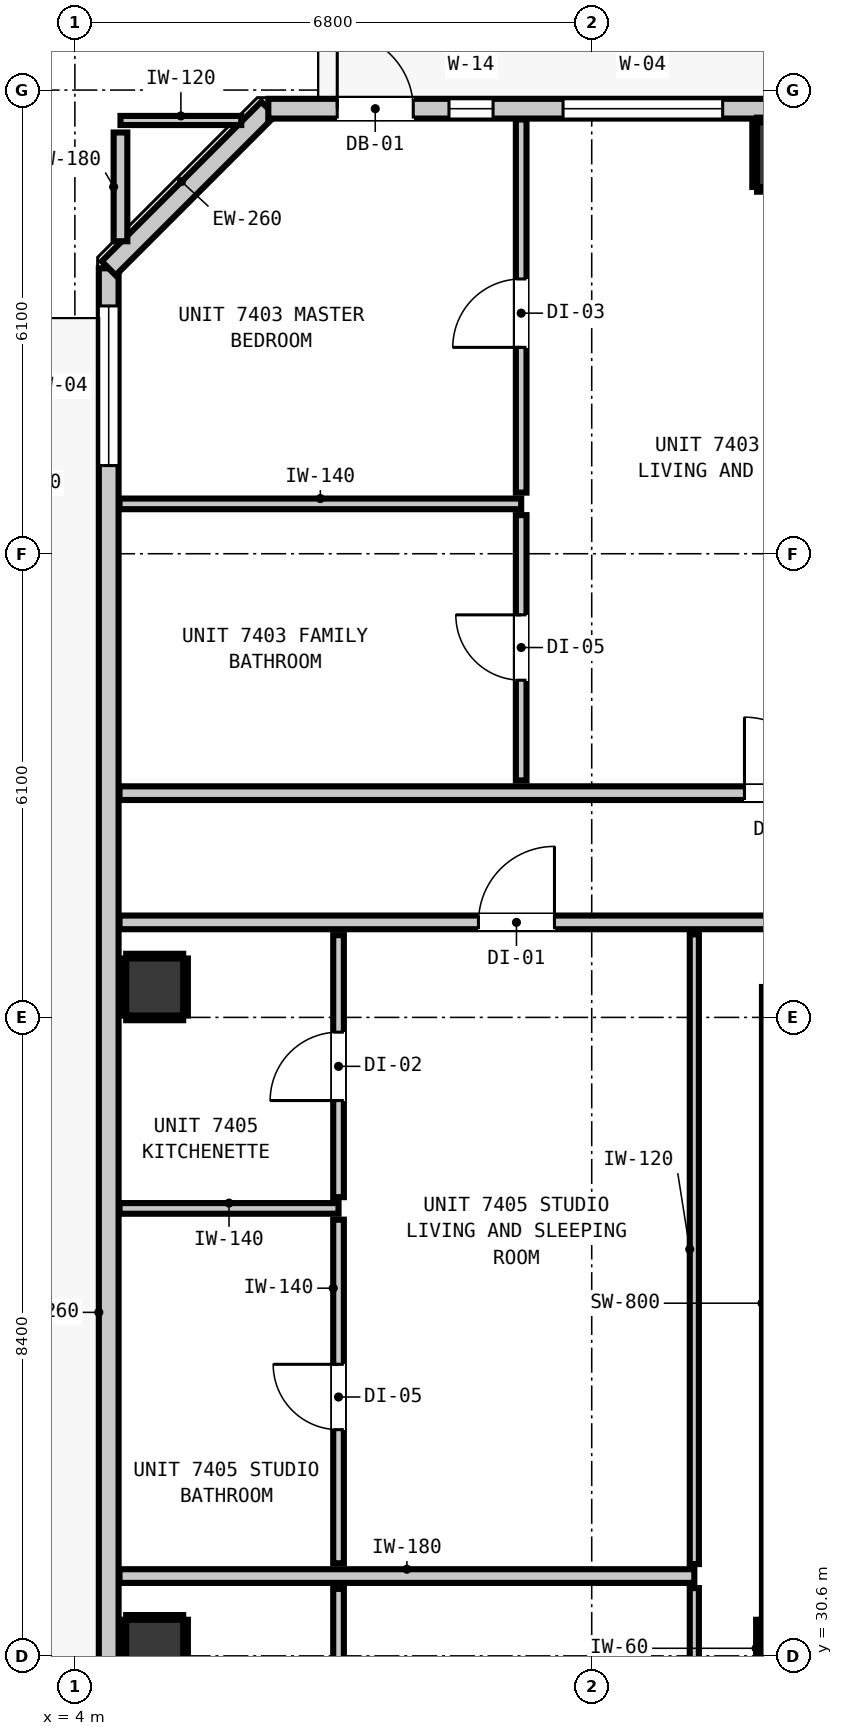
"""IFC4 building model, lengths in metres.
Left out: names, types, materials, properties, quantities, classifications, styles, units other than length and angle.
Written with IfcOpenShell. Run it as: python <this file> out.ifc"""

import sys

from ifc_helpers import new_model, si_unit, direction, frame, frame_2d, origin, origin_2d, place, context, subcontext, project, spatial, rectangle, extrude, element, fill, save


model = new_model("IFC4")
c1 = context("Model", 3, precision=1e-05, world=origin(), true_north=direction((0.0, 1.0)))
c2 = subcontext(c1, "Body", "Model", "MODEL_VIEW")
j1 = project(units=[si_unit("LENGTHUNIT", "METRE"), si_unit("PLANEANGLEUNIT", "RADIAN")], contexts=[c1])
p1 = place(None, origin())
s1 = spatial("IfcSite", under=j1, at=p1, CompositionType="ELEMENT")
p2 = place(p1, origin())
s2 = spatial("IfcBuilding", under=s1, at=p2, CompositionType="ELEMENT")
p3 = place(p2, frame((0.0, 0.0, 254.52)))
s3 = spatial("IfcBuildingStorey", under=s2, at=p3, CompositionType="ELEMENT", Elevation=254.52)
p4 = place(p3, frame((13.4, 30.7, 0.0), z_axis=(0.0, 0.0, 1.0), x_axis=(1.0, 0.0, 0.0)))
e1 = element("IfcColumn", 1, at=p4, inside=s3, PredefinedType="COLUMN", context=c2, shape_type="SweptSolid", body=[
    extrude(rectangle(XDim=0.75, YDim=0.75, at=origin_2d()), origin(), (0.0, 0.0, 1.0), 3.32),
])
p5 = place(p3, frame((13.44, 31.08, 0.0), z_axis=(0.0, 0.0, 1.0), x_axis=(0.0, 1.0, 0.0)))
e2 = element("IfcWall", 2, at=p5, inside=s3, PredefinedType="SHEAR", context=c2, shape_type="SweptSolid", body=[
    extrude(rectangle(XDim=8.32, YDim=0.8, at=frame_2d((4.16, 0.0))), origin(), (0.0, 0.0, 1.0), 3.32),
])
p6 = place(p3, frame((13.4, 50.35, 0.0), z_axis=(0.0, 0.0, 1.0), x_axis=(1.0, 0.0, 0.0)))
e3 = element("IfcColumn", 3, at=p6, inside=s3, PredefinedType="COLUMN", context=c2, shape_type="SweptSolid", body=[
    extrude(rectangle(XDim=0.85, YDim=0.85, at=origin_2d()), origin(), (0.0, 0.0, 1.0), 3.32),
])
for number, where, z_axis, x_axis in (
    (4, (5.05, 30.7, 0.0), (0.0, 0.0, 1.0), (1.0, 0.0, 0.0)),
    (5, (5.05, 39.4, 0.0), (0.0, 0.0, 1.0), (1.0, 0.0, 0.0)),
):
    element("IfcColumn", number, at=place(p3, frame(where, z_axis=z_axis, x_axis=x_axis)), inside=s3, PredefinedType="COLUMN", context=c2, shape_type="SweptSolid", body=[
        extrude(rectangle(XDim=0.75, YDim=0.75, at=origin_2d()), origin(), (0.0, 0.0, 1.0), 3.32),
    ])
p7 = place(p3, frame((4.445, 18.545, 0.0), z_axis=(0.0, 0.0, 1.0), x_axis=(0.0, 1.0, 0.0)))
e6 = element("IfcWall", 6, at=p7, inside=s3, PredefinedType="STANDARD", context=c2, shape_type="SweptSolid", body=[
    extrude(rectangle(XDim=30.31, YDim=0.26, at=frame_2d((15.155, 0.0))), origin(), (0.0, 0.0, 1.0), 2.96),
])
p8 = place(p7, frame((4.434, 0.0, 0.0)))
e7 = element("IfcOpeningElement", 7, at=p8, cuts=e6, PredefinedType="OPENING", context=c2, shape_type="SweptSolid", body=[
    extrude(rectangle(XDim=1.0, YDim=2.15, at=frame_2d((0.5, 1.075))), frame((0.0, 0.14, 0.0), z_axis=(0.0, -1.0, 0.0), x_axis=(1.0, 0.0, 0.0)), (0.0, 0.0, 1.0), 0.28),
])
p9 = place(p7, frame((27.715, 0.0, 0.85)))
e8 = element("IfcOpeningElement", 8, at=p9, cuts=e6, PredefinedType="OPENING", context=c2, shape_type="SweptSolid", body=[
    extrude(rectangle(XDim=2.1, YDim=1.9, at=frame_2d((1.05, 0.95))), frame((0.0, 0.14, 0.0), z_axis=(0.0, -1.0, 0.0), x_axis=(1.0, 0.0, 0.0)), (0.0, 0.0, 1.0), 0.28),
])
p10 = place(p3, frame((4.445, 48.855, 0.0), z_axis=(0.0, 0.0, 1.0), x_axis=(0.707065676302, 0.707147883682, 0.0)))
e9 = element("IfcWall", 9, at=p10, inside=s3, PredefinedType="STANDARD", context=c2, shape_type="SweptSolid", body=[
    extrude(rectangle(XDim=2.97, YDim=0.26, at=frame_2d((1.485, 0.0))), origin(), (0.0, 0.0, 1.0), 2.96),
])
p11 = place(p3, frame((6.545, 50.955, 0.0), z_axis=(0.0, 0.0, 1.0), x_axis=(1.0, 0.0, 0.0)))
e10 = element("IfcWall", 10, at=p11, inside=s3, PredefinedType="STANDARD", context=c2, shape_type="SweptSolid", body=[
    extrude(rectangle(XDim=32.71, YDim=0.26, at=frame_2d((16.355, 0.0))), origin(), (0.0, 0.0, 1.0), 2.96),
])
p12 = place(p11, frame((0.907, 0.0, 0.0)))
e11 = element("IfcOpeningElement", 11, at=p12, cuts=e10, PredefinedType="OPENING", context=c2, shape_type="SweptSolid", body=[
    extrude(rectangle(XDim=1.0, YDim=2.15, at=frame_2d((0.5, 1.075))), frame((0.0, 0.14, 0.0), z_axis=(0.0, -1.0, 0.0), x_axis=(1.0, 0.0, 0.0)), (0.0, 0.0, 1.0), 0.28),
])
p13 = place(p11, frame((3.878, 0.0, 0.85)))
e12 = element("IfcOpeningElement", 12, at=p13, cuts=e10, PredefinedType="OPENING", context=c2, shape_type="SweptSolid", body=[
    extrude(rectangle(XDim=2.1, YDim=1.9, at=frame_2d((1.05, 0.95))), frame((0.0, 0.14, 0.0), z_axis=(0.0, -1.0, 0.0), x_axis=(1.0, 0.0, 0.0)), (0.0, 0.0, 1.0), 0.28),
])
p14 = place(p11, frame((2.377, 0.0, 0.85)))
e13 = element("IfcOpeningElement", 13, at=p14, cuts=e10, PredefinedType="OPENING", context=c2, shape_type="SweptSolid", body=[
    extrude(rectangle(XDim=0.58, YDim=1.5, at=frame_2d((0.29, 0.75))), frame((0.0, 0.14, 0.0), z_axis=(0.0, -1.0, 0.0), x_axis=(1.0, 0.0, 0.0)), (0.0, 0.0, 1.0), 0.28),
])
p15 = place(p11, frame((11.016, 0.0, 0.85)))
e14 = element("IfcOpeningElement", 14, at=p15, cuts=e10, PredefinedType="OPENING", context=c2, shape_type="SweptSolid", body=[
    extrude(rectangle(XDim=2.1, YDim=1.9, at=frame_2d((1.05, 0.95))), frame((0.0, 0.14, 0.0), z_axis=(0.0, -1.0, 0.0), x_axis=(1.0, 0.0, 0.0)), (0.0, 0.0, 1.0), 0.28),
])
p16 = place(p11, frame((17.555, 0.0, 0.85)))
e15 = element("IfcOpeningElement", 15, at=p16, cuts=e10, PredefinedType="OPENING", context=c2, shape_type="SweptSolid", body=[
    extrude(rectangle(XDim=2.1, YDim=1.9, at=frame_2d((1.05, 0.95))), frame((0.0, 0.14, 0.0), z_axis=(0.0, -1.0, 0.0), x_axis=(1.0, 0.0, 0.0)), (0.0, 0.0, 1.0), 0.28),
])
p17 = place(p11, frame((25.255, 0.0, 0.85)))
e16 = element("IfcOpeningElement", 16, at=p17, cuts=e10, PredefinedType="OPENING", context=c2, shape_type="SweptSolid", body=[
    extrude(rectangle(XDim=2.1, YDim=1.9, at=frame_2d((1.05, 0.95))), frame((0.0, 0.14, 0.0), z_axis=(0.0, -1.0, 0.0), x_axis=(1.0, 0.0, 0.0)), (0.0, 0.0, 1.0), 0.28),
])
p18 = place(p3, frame((4.587, 31.65, 0.0), z_axis=(0.0, 0.0, 1.0), x_axis=(1.0, 0.0, 0.0)))
e17 = element("IfcWall", 17, at=p18, inside=s3, PredefinedType="PARTITIONING", context=c2, shape_type="SweptSolid", body=[
    extrude(rectangle(XDim=7.563, YDim=0.18, at=frame_2d((3.781, 0.0))), origin(), (0.0, 0.0, 1.0), 2.96),
])
p19 = place(p3, frame((4.587, 40.25, 0.0), z_axis=(0.0, 0.0, 1.0), x_axis=(1.0, 0.0, 0.0)))
e18 = element("IfcWall", 18, at=p19, inside=s3, PredefinedType="PARTITIONING", context=c2, shape_type="SweptSolid", body=[
    extrude(rectangle(XDim=36.626, YDim=0.18, at=frame_2d((18.313, 0.0))), origin(), (0.0, 0.0, 1.0), 2.96),
])
p20 = place(p19, frame((12.848, 0.0, 0.0)))
e19 = element("IfcOpeningElement", 19, at=p20, cuts=e18, PredefinedType="OPENING", context=c2, shape_type="SweptSolid", body=[
    extrude(rectangle(XDim=1.4, YDim=2.15, at=frame_2d((0.7, 1.075))), frame((0.0, 0.1, 0.0), z_axis=(0.0, -1.0, 0.0), x_axis=(1.0, 0.0, 0.0)), (0.0, 0.0, 1.0), 0.2),
])
p21 = place(p19, frame((4.723, 0.0, 0.0)))
e20 = element("IfcOpeningElement", 20, at=p21, cuts=e18, PredefinedType="OPENING", context=c2, shape_type="SweptSolid", body=[
    extrude(rectangle(XDim=1.0, YDim=2.15, at=frame_2d((0.5, 1.075))), frame((0.0, 0.1, 0.0), z_axis=(0.0, -1.0, 0.0), x_axis=(1.0, 0.0, 0.0)), (0.0, 0.0, 1.0), 0.2),
])
p22 = place(p3, frame((4.587, 41.95, 0.0), z_axis=(0.0, 0.0, 1.0), x_axis=(1.0, 0.0, 0.0)))
e21 = element("IfcWall", 21, at=p22, inside=s3, PredefinedType="PARTITIONING", context=c2, shape_type="SweptSolid", body=[
    extrude(rectangle(XDim=36.626, YDim=0.18, at=frame_2d((18.313, 0.0))), origin(), (0.0, 0.0, 1.0), 2.96),
])
p23 = place(p22, frame((8.223, 0.0, 0.0)))
e22 = element("IfcOpeningElement", 22, at=p23, cuts=e21, PredefinedType="OPENING", context=c2, shape_type="SweptSolid", body=[
    extrude(rectangle(XDim=1.0, YDim=2.15, at=frame_2d((0.5, 1.075))), frame((0.0, 0.1, 0.0), z_axis=(0.0, -1.0, 0.0), x_axis=(1.0, 0.0, 0.0)), (0.0, 0.0, 1.0), 0.2),
])
p24 = place(p22, frame((29.299, 0.0, 0.0)))
e23 = element("IfcOpeningElement", 23, at=p24, cuts=e21, PredefinedType="OPENING", context=c2, shape_type="SweptSolid", body=[
    extrude(rectangle(XDim=0.9, YDim=2.1, at=frame_2d((0.45, 1.05))), frame((0.0, 0.1, 0.0), z_axis=(0.0, -1.0, 0.0), x_axis=(1.0, 0.0, 0.0)), (0.0, 0.0, 1.0), 0.2),
])
p25 = place(p3, frame((4.587, 36.487, 0.0), z_axis=(0.0, 0.0, 1.0), x_axis=(1.0, 0.0, 0.0)))
e24 = element("IfcWall", 24, at=p25, inside=s3, PredefinedType="PARTITIONING", context=c2, shape_type="SweptSolid", body=[
    extrude(rectangle(XDim=2.882, YDim=0.14, at=frame_2d((1.441, 0.0))), origin(), (0.0, 0.0, 1.0), 2.96),
])
p26 = place(p3, frame((4.587, 45.756, 0.0), z_axis=(0.0, 0.0, 1.0), x_axis=(1.0, 0.0, 0.0)))
e25 = element("IfcWall", 25, at=p26, inside=s3, PredefinedType="PARTITIONING", context=c2, shape_type="SweptSolid", body=[
    extrude(rectangle(XDim=5.285, YDim=0.14, at=frame_2d((2.643, 0.0))), origin(), (0.0, 0.0, 1.0), 2.96),
])
p27 = place(p3, frame((4.6, 50.8, 0.0), z_axis=(0.0, 0.0, 1.0), x_axis=(1.0, 0.0, 0.0)))
e26 = element("IfcWall", 26, at=p27, inside=s3, PredefinedType="PARTITIONING", context=c2, shape_type="SweptSolid", body=[
    extrude(rectangle(XDim=1.589, YDim=0.12, at=frame_2d((0.794, 0.0))), origin(), (0.0, 0.0, 1.0), 2.96),
])
p28 = place(p3, frame((4.6, 49.211, 0.0), z_axis=(0.0, 0.0, 1.0), x_axis=(0.0, 1.0, 0.0)))
e27 = element("IfcWall", 27, at=p28, inside=s3, PredefinedType="PARTITIONING", context=c2, shape_type="SweptSolid", body=[
    extrude(rectangle(XDim=1.431, YDim=0.18, at=frame_2d((0.716, 0.0))), origin(), (0.0, 0.0, 1.0), 2.96),
])
p29 = place(p3, frame((7.469, 26.448, 0.0), z_axis=(0.0, 0.0, 1.0), x_axis=(0.0, 1.0, 0.0)))
e28 = element("IfcWall", 28, at=p29, inside=s3, PredefinedType="PARTITIONING", context=c2, shape_type="SweptSolid", body=[
    extrude(rectangle(XDim=5.034, YDim=0.14, at=frame_2d((2.517, 0.0))), origin(), (0.0, 0.0, 1.0), 2.96),
])
p30 = place(p29, frame((2.009, 0.0, 0.0)))
e29 = element("IfcOpeningElement", 29, at=p30, cuts=e28, PredefinedType="OPENING", context=c2, shape_type="SweptSolid", body=[
    extrude(rectangle(XDim=0.86, YDim=2.02, at=frame_2d((0.43, 1.01))), frame((0.0, 0.08, 0.0), z_axis=(0.0, -1.0, 0.0), x_axis=(1.0, 0.0, 0.0)), (0.0, 0.0, 1.0), 0.16),
])
p31 = place(p3, frame((7.469, 31.818, 0.0), z_axis=(0.0, 0.0, 1.0), x_axis=(0.0, 1.0, 0.0)))
e30 = element("IfcWall", 30, at=p31, inside=s3, PredefinedType="PARTITIONING", context=c2, shape_type="SweptSolid", body=[
    extrude(rectangle(XDim=4.521, YDim=0.14, at=frame_2d((2.26, 0.0))), origin(), (0.0, 0.0, 1.0), 2.96),
])
p32 = place(p31, frame((1.758, 0.0, 0.0)))
e31 = element("IfcOpeningElement", 31, at=p32, cuts=e30, PredefinedType="OPENING", context=c2, shape_type="SweptSolid", body=[
    extrude(rectangle(XDim=0.86, YDim=2.02, at=frame_2d((0.43, 1.01))), frame((0.0, 0.08, 0.0), z_axis=(0.0, -1.0, 0.0), x_axis=(1.0, 0.0, 0.0)), (0.0, 0.0, 1.0), 0.16),
])
p33 = place(p3, frame((7.469, 36.635, 0.0), z_axis=(0.0, 0.0, 1.0), x_axis=(0.0, 1.0, 0.0)))
e32 = element("IfcWall", 32, at=p33, inside=s3, PredefinedType="PARTITIONING", context=c2, shape_type="SweptSolid", body=[
    extrude(rectangle(XDim=3.447, YDim=0.14, at=frame_2d((1.724, 0.0))), origin(), (0.0, 0.0, 1.0), 2.96),
])
p34 = place(p33, frame((1.271, 0.0, 0.0)))
e33 = element("IfcOpeningElement", 33, at=p34, cuts=e32, PredefinedType="OPENING", context=c2, shape_type="SweptSolid", body=[
    extrude(rectangle(XDim=0.9, YDim=2.1, at=frame_2d((0.45, 1.05))), frame((0.0, 0.08, 0.0), z_axis=(0.0, -1.0, 0.0), x_axis=(1.0, 0.0, 0.0)), (0.0, 0.0, 1.0), 0.16),
])
p35 = place(p3, frame((9.872, 42.118, 0.0), z_axis=(0.0, 0.0, 1.0), x_axis=(0.0, 1.0, 0.0)))
e34 = element("IfcWall", 34, at=p35, inside=s3, PredefinedType="PARTITIONING", context=c2, shape_type="SweptSolid", body=[
    extrude(rectangle(XDim=3.49, YDim=0.14, at=frame_2d((1.745, 0.0))), origin(), (0.0, 0.0, 1.0), 2.96),
])
p36 = place(p35, frame((1.318, 0.0, 0.0)))
e35 = element("IfcOpeningElement", 35, at=p36, cuts=e34, PredefinedType="OPENING", context=c2, shape_type="SweptSolid", body=[
    extrude(rectangle(XDim=0.86, YDim=2.02, at=frame_2d((0.43, 1.01))), frame((0.0, 0.08, 0.0), z_axis=(0.0, -1.0, 0.0), x_axis=(1.0, 0.0, 0.0)), (0.0, 0.0, 1.0), 0.16),
])
p37 = place(p3, frame((9.872, 45.904, 0.0), z_axis=(0.0, 0.0, 1.0), x_axis=(0.0, 1.0, 0.0)))
e36 = element("IfcWall", 36, at=p37, inside=s3, PredefinedType="PARTITIONING", context=c2, shape_type="SweptSolid", body=[
    extrude(rectangle(XDim=4.909, YDim=0.14, at=frame_2d((2.455, 0.0))), origin(), (0.0, 0.0, 1.0), 2.96),
])
p38 = place(p37, frame((1.911, 0.0, 0.0)))
e37 = element("IfcOpeningElement", 37, at=p38, cuts=e36, PredefinedType="OPENING", context=c2, shape_type="SweptSolid", body=[
    extrude(rectangle(XDim=0.9, YDim=2.1, at=frame_2d((0.45, 1.05))), frame((0.0, 0.08, 0.0), z_axis=(0.0, -1.0, 0.0), x_axis=(1.0, 0.0, 0.0)), (0.0, 0.0, 1.0), 0.16),
])
p39 = place(p3, frame((12.15, 21.338, 0.0), z_axis=(0.0, 0.0, 1.0), x_axis=(0.0, 1.0, 0.0)))
e38 = element("IfcWall", 38, at=p39, inside=s3, PredefinedType="PARTITIONING", context=c2, shape_type="SweptSolid", body=[
    extrude(rectangle(XDim=10.154, YDim=0.12, at=frame_2d((5.077, 0.0))), origin(), (0.0, 0.0, 1.0), 2.96),
])
p40 = place(p3, frame((12.15, 31.808, 0.0), z_axis=(0.0, 0.0, 1.0), x_axis=(0.0, 1.0, 0.0)))
e39 = element("IfcWall", 39, at=p40, inside=s3, PredefinedType="PARTITIONING", context=c2, shape_type="SweptSolid", body=[
    extrude(rectangle(XDim=8.284, YDim=0.12, at=frame_2d((4.142, 0.0))), origin(), (0.0, 0.0, 1.0), 2.96),
])
p41 = place(p3, frame((12.993, 30.325, 0.0), z_axis=(0.0, 0.0, 1.0), x_axis=(0.0, 1.0, 0.0)))
e40 = element("IfcWall", 40, at=p41, inside=s3, PredefinedType="PARTITIONING", context=c2, shape_type="SweptSolid", body=[
    extrude(rectangle(XDim=0.75, YDim=0.06, at=frame_2d((0.375, 0.0))), origin(), (0.0, 0.0, 1.0), 1.45),
])
for number, where, z_axis, x_axis in (
    (41, (12.975, 49.893, 0.0), (0.0, 0.0, 1.0), (1.0, 0.0, 0.0)),
    (42, (12.975, 50.807, 0.0), (0.0, 0.0, 1.0), (1.0, 0.0, 0.0)),
    (43, (12.943, 49.925, 0.0), (0.0, 0.0, 1.0), (0.0, 1.0, 0.0)),
):
    element("IfcWall", number, at=place(p3, frame(where, z_axis=z_axis, x_axis=x_axis)), inside=s3, PredefinedType="PARTITIONING", context=c2, shape_type="SweptSolid", body=[
        extrude(rectangle(XDim=0.85, YDim=0.06, at=frame_2d((0.425, 0.0))), origin(), (0.0, 0.0, 1.0), 1.45),
    ])
for number, where, z_axis, x_axis in (
    (44, (4.675, 31.107, 0.0), (0.0, 0.0, 1.0), (1.0, 0.0, 0.0)),
    (45, (4.643, 30.325, 0.0), (0.0, 0.0, 1.0), (0.0, 1.0, 0.0)),
    (46, (5.457, 30.325, 0.0), (0.0, 0.0, 1.0), (0.0, 1.0, 0.0)),
    (47, (4.675, 38.993, 0.0), (0.0, 0.0, 1.0), (1.0, 0.0, 0.0)),
    (48, (4.675, 39.807, 0.0), (0.0, 0.0, 1.0), (1.0, 0.0, 0.0)),
    (49, (4.643, 39.025, 0.0), (0.0, 0.0, 1.0), (0.0, 1.0, 0.0)),
    (50, (5.457, 39.025, 0.0), (0.0, 0.0, 1.0), (0.0, 1.0, 0.0)),
):
    element("IfcWall", number, at=place(p3, frame(where, z_axis=z_axis, x_axis=x_axis)), inside=s3, PredefinedType="PARTITIONING", context=c2, shape_type="SweptSolid", body=[
        extrude(rectangle(XDim=0.75, YDim=0.06, at=frame_2d((0.375, 0.0))), origin(), (0.0, 0.0, 1.0), 1.45),
    ])
p42 = place(p12, origin())
e51 = element("IfcDoor", 51, at=p42, inside=s3, OperationType="SINGLE_SWING_LEFT", PredefinedType="DOOR", context=c2, shape_type="SweptSolid", body=[
    extrude(rectangle(XDim=1.0, YDim=2.15, at=frame_2d((0.5, 1.075))), frame((0.0, 0.025, 0.0), z_axis=(0.0, -1.0, 0.0), x_axis=(1.0, 0.0, 0.0)), (0.0, 0.0, 1.0), 0.05),
])
fill(e11, e51)
p43 = place(p9, origin())
e52 = element("IfcWindow", 52, at=p43, inside=s3, PartitioningType="SINGLE_PANEL", PredefinedType="WINDOW", context=c2, shape_type="SweptSolid", body=[
    extrude(rectangle(XDim=2.1, YDim=1.9, at=frame_2d((1.05, 0.95))), frame((0.0, 0.03, 0.0), z_axis=(0.0, -1.0, 0.0), x_axis=(1.0, 0.0, 0.0)), (0.0, 0.0, 1.0), 0.06),
])
fill(e8, e52)
p44 = place(p13, origin())
e53 = element("IfcWindow", 53, at=p44, inside=s3, PartitioningType="SINGLE_PANEL", PredefinedType="WINDOW", context=c2, shape_type="SweptSolid", body=[
    extrude(rectangle(XDim=2.1, YDim=1.9, at=frame_2d((1.05, 0.95))), frame((0.0, 0.03, 0.0), z_axis=(0.0, -1.0, 0.0), x_axis=(1.0, 0.0, 0.0)), (0.0, 0.0, 1.0), 0.06),
])
fill(e12, e53)
p45 = place(p14, origin())
e54 = element("IfcWindow", 54, at=p45, inside=s3, PartitioningType="SINGLE_PANEL", PredefinedType="WINDOW", context=c2, shape_type="SweptSolid", body=[
    extrude(rectangle(XDim=0.58, YDim=1.5, at=frame_2d((0.29, 0.75))), frame((0.0, 0.03, 0.0), z_axis=(0.0, -1.0, 0.0), x_axis=(1.0, 0.0, 0.0)), (0.0, 0.0, 1.0), 0.06),
])
fill(e13, e54)
p46 = place(p23, origin())
e55 = element("IfcDoor", 55, at=p46, inside=s3, OperationType="SINGLE_SWING_LEFT", PredefinedType="DOOR", context=c2, shape_type="SweptSolid", body=[
    extrude(rectangle(XDim=1.0, YDim=2.15, at=frame_2d((0.5, 1.075))), frame((0.0, 0.025, 0.0), z_axis=(0.0, -1.0, 0.0), x_axis=(1.0, 0.0, 0.0)), (0.0, 0.0, 1.0), 0.05),
])
fill(e22, e55)
p47 = place(p36, origin())
e56 = element("IfcDoor", 56, at=p47, inside=s3, OperationType="SINGLE_SWING_RIGHT", PredefinedType="DOOR", context=c2, shape_type="SweptSolid", body=[
    extrude(rectangle(XDim=0.86, YDim=2.02, at=frame_2d((0.43, 1.01))), frame((0.0, 0.025, 0.0), z_axis=(0.0, -1.0, 0.0), x_axis=(1.0, 0.0, 0.0)), (0.0, 0.0, 1.0), 0.05),
])
fill(e35, e56)
p48 = place(p38, origin())
e57 = element("IfcDoor", 57, at=p48, inside=s3, OperationType="SINGLE_SWING_LEFT", PredefinedType="DOOR", context=c2, shape_type="SweptSolid", body=[
    extrude(rectangle(XDim=0.9, YDim=2.1, at=frame_2d((0.45, 1.05))), frame((0.0, 0.025, 0.0), z_axis=(0.0, -1.0, 0.0), x_axis=(1.0, 0.0, 0.0)), (0.0, 0.0, 1.0), 0.05),
])
fill(e37, e57)
p49 = place(p21, origin())
e58 = element("IfcDoor", 58, at=p49, inside=s3, OperationType="SINGLE_SWING_RIGHT", PredefinedType="DOOR", context=c2, shape_type="SweptSolid", body=[
    extrude(rectangle(XDim=1.0, YDim=2.15, at=frame_2d((0.5, 1.075))), frame((0.0, 0.025, 0.0), z_axis=(0.0, -1.0, 0.0), x_axis=(1.0, 0.0, 0.0)), (0.0, 0.0, 1.0), 0.05),
])
fill(e20, e58)
p50 = place(p34, origin())
e59 = element("IfcDoor", 59, at=p50, inside=s3, OperationType="SINGLE_SWING_LEFT", PredefinedType="DOOR", context=c2, shape_type="SweptSolid", body=[
    extrude(rectangle(XDim=0.9, YDim=2.1, at=frame_2d((0.45, 1.05))), frame((0.0, 0.025, 0.0), z_axis=(0.0, -1.0, 0.0), x_axis=(1.0, 0.0, 0.0)), (0.0, 0.0, 1.0), 0.05),
])
fill(e33, e59)
p51 = place(p32, origin())
e60 = element("IfcDoor", 60, at=p51, inside=s3, OperationType="SINGLE_SWING_RIGHT", PredefinedType="DOOR", context=c2, shape_type="SweptSolid", body=[
    extrude(rectangle(XDim=0.86, YDim=2.02, at=frame_2d((0.43, 1.01))), frame((0.0, 0.025, 0.0), z_axis=(0.0, -1.0, 0.0), x_axis=(1.0, 0.0, 0.0)), (0.0, 0.0, 1.0), 0.05),
])
fill(e31, e60)
save(model, sys.argv[1])
